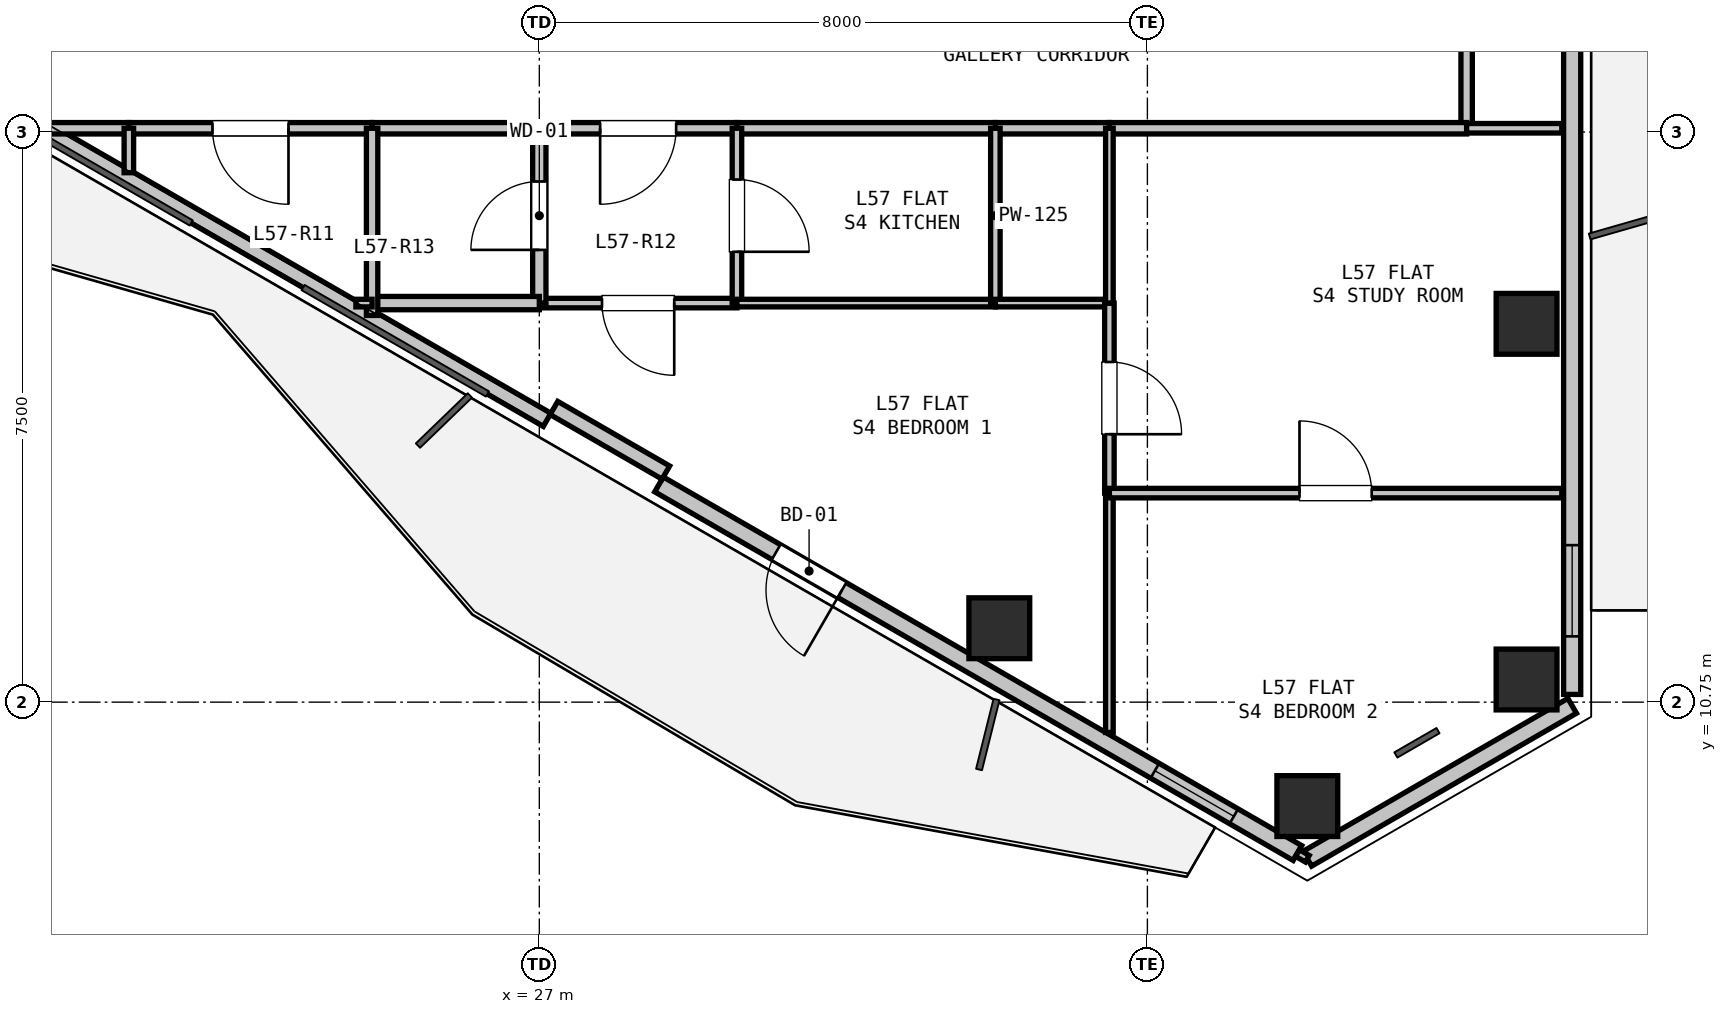
"""IFC4 building model, lengths in metres.
Left out: names, types, materials, properties, quantities, classifications, styles, units other than length and angle.
Written with IfcOpenShell. Run it as: python <this file> out.ifc"""

import sys

from ifc_helpers import new_model, si_unit, direction, frame, frame_2d, origin, origin_2d, place, context, subcontext, project, spatial, rectangle, hollow_rectangle, extrude, element, fill, save


model = new_model("IFC4")
c1 = context("Model", 3, precision=1e-05, world=origin(), true_north=direction((0.0, 1.0)))
c2 = subcontext(c1, "Body", "Model", "MODEL_VIEW")
j1 = project(units=[si_unit("LENGTHUNIT", "METRE"), si_unit("PLANEANGLEUNIT", "RADIAN")], contexts=[c1])
p1 = place(None, origin())
s1 = spatial("IfcSite", under=j1, at=p1, CompositionType="ELEMENT")
p2 = place(p1, origin())
s2 = spatial("IfcBuilding", under=s1, at=p2, CompositionType="ELEMENT")
p3 = place(p2, frame((0.0, 0.0, 205.2)))
s3 = spatial("IfcBuildingStorey", under=s2, at=p3, CompositionType="ELEMENT", Elevation=205.2)
for number, where, z_axis, x_axis in (
    (1, (39.988, 15.727, 0.0), (0.0, 0.0, 1.0), (1.0, 0.0, 0.0)),
    (2, (39.988, 11.048, 0.0), (0.0, 0.0, 1.0), (1.0, 0.0, 0.0)),
    (3, (37.104, 9.383, 0.0), (0.0, 0.0, 1.0), (1.0, 0.0, 0.0)),
    (4, (33.052, 11.722, 0.0), (0.0, 0.0, 1.0), (1.0, 0.0, 0.0)),
):
    element("IfcColumn", number, at=place(p3, frame(where, z_axis=z_axis, x_axis=x_axis)), inside=s3, PredefinedType="COLUMN", context=c2, shape_type="SweptSolid", body=[
        extrude(hollow_rectangle(XDim=0.8, YDim=0.8, WallThickness=0.025, at=origin_2d()), origin(), (0.0, 0.0, 1.0), 3.3),
    ])
p4 = place(p3, frame((40.588, 10.702, 0.0), z_axis=(0.0, 0.0, 1.0), x_axis=(-0.866023907196, -0.500002592159, 0.0)))
e5 = element("IfcWall", 5, at=p4, inside=s3, PredefinedType="SOLIDWALL", context=c2, shape_type="SweptSolid", body=[
    extrude(rectangle(XDim=4.023, YDim=0.225, at=frame_2d((2.012, 0.0))), origin(), (0.0, 0.0, 1.0), 2.69),
])
p5 = place(p3, frame((40.588, 20.551, 0.0), z_axis=(0.0, 0.0, 1.0), x_axis=(0.0, -1.0, 0.0)))
e6 = element("IfcWall", 6, at=p5, inside=s3, PredefinedType="SOLIDWALL", context=c2, shape_type="SweptSolid", body=[
    extrude(rectangle(XDim=9.699, YDim=0.225, at=frame_2d((4.85, 0.0))), origin(), (0.0, 0.0, 1.0), 2.69),
])
p6 = place(p5, frame((7.735, 0.0, 0.9)))
e7 = element("IfcOpeningElement", 7, at=p6, cuts=e6, PredefinedType="OPENING", context=c2, shape_type="SweptSolid", body=[
    extrude(rectangle(XDim=1.2, YDim=1.4, at=frame_2d((0.6, 0.7))), frame((0.0, 0.123, 0.0), z_axis=(0.0, -1.0, 0.0), x_axis=(1.0, 0.0, 0.0)), (0.0, 0.0, 1.0), 0.245),
])
p7 = place(p3, frame((36.974, 8.765, 0.0), z_axis=(0.0, 0.0, 1.0), x_axis=(-0.866016233231, 0.500015883528, 0.0)))
e8 = element("IfcWall", 8, at=p7, inside=s3, PredefinedType="SOLIDWALL", context=c2, shape_type="SweptSolid", body=[
    extrude(rectangle(XDim=9.699, YDim=0.225, at=frame_2d((4.85, 0.0))), origin(), (0.0, 0.0, 1.0), 2.69),
])
p8 = place(p7, frame((6.919, 0.0, 0.0)))
e9 = element("IfcOpeningElement", 9, at=p8, cuts=e8, PredefinedType="OPENING", context=c2, shape_type="SweptSolid", body=[
    extrude(rectangle(XDim=1.0, YDim=2.1, at=frame_2d((0.5, 1.05))), frame((0.0, 0.123, 0.0), z_axis=(0.0, -1.0, 0.0), x_axis=(1.0, 0.0, 0.0)), (0.0, 0.0, 1.0), 0.245),
])
p9 = place(p7, frame((0.966, 0.0, 0.9)))
e10 = element("IfcOpeningElement", 10, at=p9, cuts=e8, PredefinedType="OPENING", context=c2, shape_type="SweptSolid", body=[
    extrude(rectangle(XDim=1.2, YDim=1.4, at=frame_2d((0.6, 0.7))), frame((0.0, 0.123, 0.0), z_axis=(0.0, -1.0, 0.0), x_axis=(1.0, 0.0, 0.0)), (0.0, 0.0, 1.0), 0.245),
])
p10 = place(p3, frame((27.102, 14.464, 0.0), z_axis=(0.0, 0.0, 1.0), x_axis=(-0.866020680503, 0.500008180874, 0.0)))
e11 = element("IfcWall", 11, at=p10, inside=s3, PredefinedType="PARAPET", context=c2, shape_type="SweptSolid", body=[
    extrude(rectangle(XDim=8.999, YDim=0.2, at=frame_2d((4.5, 0.0))), origin(), (0.0, 0.0, 1.0), 0.2),
])
p11 = place(p3, frame((28.665, 13.77, 0.0), z_axis=(0.0, 0.0, 1.0), x_axis=(-0.866025371046, 0.500000056704, 0.0)))
e12 = element("IfcWall", 12, at=p11, inside=s3, PredefinedType="PARAPET", context=c2, shape_type="SweptSolid", body=[
    extrude(rectangle(XDim=1.7, YDim=0.2, at=frame_2d((0.85, 0.0))), origin(), (0.0, 0.0, 1.0), 2.69),
])
p12 = place(p3, frame((39.2, 19.9, 0.0), z_axis=(0.0, 0.0, 1.0), x_axis=(0.0, -1.0, 0.0)))
e13 = element("IfcWall", 13, at=p12, inside=s3, PredefinedType="PARTITIONING", context=c2, shape_type="SweptSolid", body=[
    extrude(rectangle(XDim=1.6, YDim=0.15, at=frame_2d((0.8, 0.0))), origin(), (0.0, 0.0, 1.0), 3.07),
])
p13 = place(p3, frame((39.2, 18.3, 0.0), z_axis=(0.0, 0.0, 1.0), x_axis=(-1.0, 0.0, 0.0)))
e14 = element("IfcWall", 14, at=p13, inside=s3, PredefinedType="PARTITIONING", context=c2, shape_type="SweptSolid", body=[
    extrude(rectangle(XDim=4.7, YDim=0.15, at=frame_2d((2.35, 0.0))), origin(), (0.0, 0.0, 1.0), 2.518),
])
p14 = place(p3, frame((34.5, 18.3, 0.0), z_axis=(0.0, 0.0, 1.0), x_axis=(-1.0, 0.0, 0.0)))
e15 = element("IfcWall", 15, at=p14, inside=s3, PredefinedType="PARTITIONING", context=c2, shape_type="SweptSolid", body=[
    extrude(rectangle(XDim=1.5, YDim=0.15, at=frame_2d((0.75, 0.0))), origin(), (0.0, 0.0, 1.0), 3.07),
])
p15 = place(p3, frame((33.0, 18.3, 0.0), z_axis=(0.0, 0.0, 1.0), x_axis=(-1.0, 0.0, 0.0)))
e16 = element("IfcWall", 16, at=p15, inside=s3, PredefinedType="PARTITIONING", context=c2, shape_type="SweptSolid", body=[
    extrude(rectangle(XDim=3.4, YDim=0.15, at=frame_2d((1.7, 0.0))), origin(), (0.0, 0.0, 1.0), 3.07),
])
p16 = place(p3, frame((29.6, 18.3, 0.0), z_axis=(0.0, 0.0, 1.0), x_axis=(-1.0, 0.0, 0.0)))
e17 = element("IfcWall", 17, at=p16, inside=s3, PredefinedType="PARTITIONING", context=c2, shape_type="SweptSolid", body=[
    extrude(rectangle(XDim=2.6, YDim=0.15, at=frame_2d((1.3, 0.0))), origin(), (0.0, 0.0, 1.0), 3.07),
])
p17 = place(p16, frame((0.8, 0.0, 0.0)))
e18 = element("IfcOpeningElement", 18, at=p17, cuts=e17, PredefinedType="OPENING", context=c2, shape_type="SweptSolid", body=[
    extrude(rectangle(XDim=1.0, YDim=2.15, at=frame_2d((0.5, 1.075))), frame((0.0, 0.085, 0.0), z_axis=(0.0, -1.0, 0.0), x_axis=(1.0, 0.0, 0.0)), (0.0, 0.0, 1.0), 0.17),
])
p18 = place(p3, frame((27.0, 18.3, 0.0), z_axis=(0.0, 0.0, 1.0), x_axis=(-1.0, 0.0, 0.0)))
e19 = element("IfcWall", 19, at=p18, inside=s3, PredefinedType="PARTITIONING", context=c2, shape_type="SweptSolid", body=[
    extrude(rectangle(XDim=2.2, YDim=0.15, at=frame_2d((1.1, 0.0))), origin(), (0.0, 0.0, 1.0), 2.518),
])
p19 = place(p3, frame((24.8, 18.3, 0.0), z_axis=(0.0, 0.0, 1.0), x_axis=(-1.0, 0.0, 0.0)))
e20 = element("IfcWall", 20, at=p19, inside=s3, PredefinedType="PARTITIONING", context=c2, shape_type="SweptSolid", body=[
    extrude(rectangle(XDim=3.2, YDim=0.15, at=frame_2d((1.6, 0.0))), origin(), (0.0, 0.0, 1.0), 2.365),
])
p20 = place(p19, frame((1.1, 0.0, 0.0)))
e21 = element("IfcOpeningElement", 21, at=p20, cuts=e20, PredefinedType="OPENING", context=c2, shape_type="SweptSolid", body=[
    extrude(rectangle(XDim=1.0, YDim=2.15, at=frame_2d((0.5, 1.075))), frame((0.0, 0.085, 0.0), z_axis=(0.0, -1.0, 0.0), x_axis=(1.0, 0.0, 0.0)), (0.0, 0.0, 1.0), 0.17),
])
p21 = place(p3, frame((21.6, 18.3, 0.0), z_axis=(0.0, 0.0, 1.0), x_axis=(-1.0, 0.0, 0.0)))
e22 = element("IfcWall", 22, at=p21, inside=s3, PredefinedType="PARTITIONING", context=c2, shape_type="SweptSolid", body=[
    extrude(rectangle(XDim=1.072, YDim=0.15, at=frame_2d((0.536, 0.0))), origin(), (0.0, 0.0, 1.0), 2.365),
])
p22 = place(p3, frame((29.6, 16.0, 0.0), z_axis=(0.0, 0.0, 1.0), x_axis=(-1.0, 0.0, 0.0)))
e23 = element("IfcWall", 23, at=p22, inside=s3, PredefinedType="PARTITIONING", context=c2, shape_type="SweptSolid", body=[
    extrude(rectangle(XDim=2.6, YDim=0.125, at=frame_2d((1.3, 0.0))), origin(), (0.0, 0.0, 1.0), 2.518),
])
p23 = place(p22, frame((0.825, 0.0, 0.0)))
e24 = element("IfcOpeningElement", 24, at=p23, cuts=e23, PredefinedType="OPENING", context=c2, shape_type="SweptSolid", body=[
    extrude(rectangle(XDim=0.95, YDim=2.1, at=frame_2d((0.475, 1.05))), frame((0.0, 0.073, 0.0), z_axis=(0.0, -1.0, 0.0), x_axis=(1.0, 0.0, 0.0)), (0.0, 0.0, 1.0), 0.145),
])
p24 = place(p3, frame((27.0, 16.0, 0.0), z_axis=(0.0, 0.0, 1.0), x_axis=(0.0, 1.0, 0.0)))
e25 = element("IfcWall", 25, at=p24, inside=s3, PredefinedType="PLUMBINGWALL", context=c2, shape_type="SweptSolid", body=[
    extrude(rectangle(XDim=2.3, YDim=0.175, at=frame_2d((1.15, 0.0))), origin(), (0.0, 0.0, 1.0), 2.518),
])
p25 = place(p24, frame((0.7, 0.0, 0.0)))
e26 = element("IfcOpeningElement", 26, at=p25, cuts=e25, PredefinedType="OPENING", context=c2, shape_type="SweptSolid", body=[
    extrude(rectangle(XDim=0.9, YDim=2.1, at=frame_2d((0.45, 1.05))), frame((0.0, 0.097, 0.0), z_axis=(0.0, -1.0, 0.0), x_axis=(1.0, 0.0, 0.0)), (0.0, 0.0, 1.0), 0.195),
])
p26 = place(p3, frame((29.6, 18.3, 0.0), z_axis=(0.0, 0.0, 1.0), x_axis=(0.0, -1.0, 0.0)))
e27 = element("IfcWall", 27, at=p26, inside=s3, PredefinedType="PARTITIONING", context=c2, shape_type="SweptSolid", body=[
    extrude(rectangle(XDim=2.3, YDim=0.125, at=frame_2d((1.15, 0.0))), origin(), (0.0, 0.0, 1.0), 3.07),
])
p27 = place(p26, frame((0.675, 0.0, 0.0)))
e28 = element("IfcOpeningElement", 28, at=p27, cuts=e27, PredefinedType="OPENING", context=c2, shape_type="SweptSolid", body=[
    extrude(rectangle(XDim=0.95, YDim=2.1, at=frame_2d((0.475, 1.05))), frame((0.0, 0.073, 0.0), z_axis=(0.0, -1.0, 0.0), x_axis=(1.0, 0.0, 0.0)), (0.0, 0.0, 1.0), 0.145),
])
p28 = place(p3, frame((27.0, 16.0, 0.0), z_axis=(0.0, 0.0, 1.0), x_axis=(-1.0, 0.0, 0.0)))
e29 = element("IfcWall", 29, at=p28, inside=s3, PredefinedType="PLUMBINGWALL", context=c2, shape_type="SweptSolid", body=[
    extrude(rectangle(XDim=2.2, YDim=0.175, at=frame_2d((1.1, 0.0))), origin(), (0.0, 0.0, 1.0), 2.365),
])
p29 = place(p3, frame((24.8, 15.838, 0.0), z_axis=(0.0, 0.0, 1.0), x_axis=(0.0, 1.0, 0.0)))
e30 = element("IfcWall", 30, at=p29, inside=s3, PredefinedType="PARTITIONING", context=c2, shape_type="SweptSolid", body=[
    extrude(rectangle(XDim=2.462, YDim=0.15, at=frame_2d((1.231, 0.0))), origin(), (0.0, 0.0, 1.0), 2.365),
])
p30 = place(p3, frame((33.0, 16.0, 0.0), z_axis=(0.0, 0.0, 1.0), x_axis=(-1.0, 0.0, 0.0)))
e31 = element("IfcWall", 31, at=p30, inside=s3, PredefinedType="PARTITIONING", context=c2, shape_type="SweptSolid", body=[
    extrude(rectangle(XDim=3.4, YDim=0.1, at=frame_2d((1.7, 0.0))), origin(), (0.0, 0.0, 1.0), 3.07),
])
p31 = place(p3, frame((33.0, 18.3, 0.0), z_axis=(0.0, 0.0, 1.0), x_axis=(0.0, -1.0, 0.0)))
e32 = element("IfcWall", 32, at=p31, inside=s3, PredefinedType="PARTITIONING", context=c2, shape_type="SweptSolid", body=[
    extrude(rectangle(XDim=2.3, YDim=0.125, at=frame_2d((1.15, 0.0))), origin(), (0.0, 0.0, 1.0), 3.07),
])
p32 = place(p3, frame((24.8, 16.0, 0.0), z_axis=(0.0, 0.0, 1.0), x_axis=(-1.0, 0.0, 0.0)))
e33 = element("IfcWall", 33, at=p32, inside=s3, PredefinedType="PARTITIONING", context=c2, shape_type="SweptSolid", body=[
    extrude(rectangle(XDim=0.213, YDim=0.1, at=frame_2d((0.106, 0.0))), origin(), (0.0, 0.0, 1.0), 3.07),
])
p33 = place(p3, frame((21.6, 17.715, 0.0), z_axis=(0.0, 0.0, 1.0), x_axis=(0.0, 1.0, 0.0)))
e34 = element("IfcWall", 34, at=p33, inside=s3, PredefinedType="PARTITIONING", context=c2, shape_type="SweptSolid", body=[
    extrude(rectangle(XDim=0.585, YDim=0.125, at=frame_2d((0.292, 0.0))), origin(), (0.0, 0.0, 1.0), 2.365),
])
p34 = place(p3, frame((33.0, 16.0, 0.0), z_axis=(0.0, 0.0, 1.0), x_axis=(1.0, 0.0, 0.0)))
e35 = element("IfcWall", 35, at=p34, inside=s3, PredefinedType="PARTITIONING", context=c2, shape_type="SweptSolid", body=[
    extrude(rectangle(XDim=1.5, YDim=0.1, at=frame_2d((0.75, 0.0))), origin(), (0.0, 0.0, 1.0), 3.07),
])
p35 = place(p3, frame((34.5, 16.0, 0.0), z_axis=(0.0, 0.0, 1.0), x_axis=(0.0, -1.0, 0.0)))
e36 = element("IfcWall", 36, at=p35, inside=s3, PredefinedType="PARTITIONING", context=c2, shape_type="SweptSolid", body=[
    extrude(rectangle(XDim=2.5, YDim=0.125, at=frame_2d((1.25, 0.0))), origin(), (0.0, 0.0, 1.0), 3.07),
])
p36 = place(p35, frame((0.775, 0.0, 0.0)))
e37 = element("IfcOpeningElement", 37, at=p36, cuts=e36, PredefinedType="OPENING", context=c2, shape_type="SweptSolid", body=[
    extrude(rectangle(XDim=0.95, YDim=2.1, at=frame_2d((0.475, 1.05))), frame((0.0, 0.073, 0.0), z_axis=(0.0, -1.0, 0.0), x_axis=(1.0, 0.0, 0.0)), (0.0, 0.0, 1.0), 0.145),
])
p37 = place(p3, frame((34.5, 13.5, 0.0), z_axis=(0.0, 0.0, 1.0), x_axis=(0.0, -1.0, 0.0)))
e38 = element("IfcWall", 38, at=p37, inside=s3, PredefinedType="PARTITIONING", context=c2, shape_type="SweptSolid", body=[
    extrude(rectangle(XDim=3.149, YDim=0.1, at=frame_2d((1.574, 0.0))), origin(), (0.0, 0.0, 1.0), 2.795),
])
p38 = place(p3, frame((34.5, 13.5, 0.0), z_axis=(0.0, 0.0, 1.0), x_axis=(1.0, 0.0, 0.0)))
e39 = element("IfcWall", 39, at=p38, inside=s3, PredefinedType="PARTITIONING", context=c2, shape_type="SweptSolid", body=[
    extrude(rectangle(XDim=5.952, YDim=0.125, at=frame_2d((2.976, 0.0))), origin(), (0.0, 0.0, 1.0), 2.518),
])
p39 = place(p38, frame((2.501, 0.0, 0.0)))
e40 = element("IfcOpeningElement", 40, at=p39, cuts=e39, PredefinedType="OPENING", context=c2, shape_type="SweptSolid", body=[
    extrude(rectangle(XDim=0.95, YDim=2.1, at=frame_2d((0.475, 1.05))), frame((0.0, 0.073, 0.0), z_axis=(0.0, -1.0, 0.0), x_axis=(1.0, 0.0, 0.0)), (0.0, 0.0, 1.0), 0.145),
])
p40 = place(p3, frame((37.104, 8.69, 0.0), z_axis=(0.0, 0.0, 1.0), x_axis=(-0.866131372301, 0.499816412211, 0.0)))
e41 = element("IfcWall", 41, at=p40, inside=s3, PredefinedType="PARTITIONING", context=c2, shape_type="SweptSolid", body=[
    extrude(rectangle(XDim=0.15, YDim=0.1, at=frame_2d((0.075, 0.0))), origin(), (0.0, 0.0, 1.0), 3.07),
])
p41 = place(p3, frame((39.2, 18.3, 0.0), z_axis=(0.0, 0.0, 1.0), x_axis=(1.0, 0.0, 0.0)))
e42 = element("IfcWall", 42, at=p41, inside=s3, PredefinedType="PARTITIONING", context=c2, shape_type="SweptSolid", body=[
    extrude(rectangle(XDim=1.252, YDim=0.125, at=frame_2d((0.626, 0.0))), origin(), (0.0, 0.0, 1.0), 2.365),
])
p42 = place(p3, frame((34.5, 16.0, 0.0), z_axis=(0.0, 0.0, 1.0), x_axis=(0.0, 1.0, 0.0)))
e43 = element("IfcWall", 43, at=p42, inside=s3, PredefinedType="PARTITIONING", context=c2, shape_type="SweptSolid", body=[
    extrude(rectangle(XDim=2.3, YDim=0.1, at=frame_2d((1.15, 0.0))), origin(), (0.0, 0.0, 1.0), 3.07),
])
p43 = place(p6, origin())
e44 = element("IfcWindow", 44, at=p43, inside=s3, PartitioningType="SINGLE_PANEL", PredefinedType="WINDOW", context=c2, shape_type="SweptSolid", body=[
    extrude(rectangle(XDim=1.2, YDim=1.4, at=frame_2d((0.6, 0.7))), frame((0.0, 0.03, 0.0), z_axis=(0.0, -1.0, 0.0), x_axis=(1.0, 0.0, 0.0)), (0.0, 0.0, 1.0), 0.06),
])
fill(e7, e44)
p44 = place(p8, origin())
e45 = element("IfcDoor", 45, at=p44, inside=s3, OperationType="SINGLE_SWING_LEFT", PredefinedType="DOOR", context=c2, shape_type="SweptSolid", body=[
    extrude(rectangle(XDim=1.0, YDim=2.1, at=frame_2d((0.5, 1.05))), frame((0.0, 0.025, 0.0), z_axis=(0.0, -1.0, 0.0), x_axis=(1.0, 0.0, 0.0)), (0.0, 0.0, 1.0), 0.05),
])
fill(e9, e45)
p45 = place(p9, origin())
e46 = element("IfcWindow", 46, at=p45, inside=s3, PartitioningType="SINGLE_PANEL", PredefinedType="WINDOW", context=c2, shape_type="SweptSolid", body=[
    extrude(rectangle(XDim=1.2, YDim=1.4, at=frame_2d((0.6, 0.7))), frame((0.0, 0.03, 0.0), z_axis=(0.0, -1.0, 0.0), x_axis=(1.0, 0.0, 0.0)), (0.0, 0.0, 1.0), 0.06),
])
fill(e10, e46)
p46 = place(p17, origin())
e47 = element("IfcDoor", 47, at=p46, inside=s3, OperationType="SINGLE_SWING_RIGHT", PredefinedType="DOOR", context=c2, shape_type="SweptSolid", body=[
    extrude(rectangle(XDim=1.0, YDim=2.15, at=frame_2d((0.5, 1.075))), frame((0.0, 0.025, 0.0), z_axis=(0.0, -1.0, 0.0), x_axis=(1.0, 0.0, 0.0)), (0.0, 0.0, 1.0), 0.05),
])
fill(e18, e47)
p47 = place(p20, origin())
e48 = element("IfcDoor", 48, at=p47, inside=s3, OperationType="SINGLE_SWING_LEFT", PredefinedType="DOOR", context=c2, shape_type="SweptSolid", body=[
    extrude(rectangle(XDim=1.0, YDim=2.15, at=frame_2d((0.5, 1.075))), frame((0.0, 0.025, 0.0), z_axis=(0.0, -1.0, 0.0), x_axis=(1.0, 0.0, 0.0)), (0.0, 0.0, 1.0), 0.05),
])
fill(e21, e48)
p48 = place(p25, origin())
e49 = element("IfcDoor", 49, at=p48, inside=s3, OperationType="SINGLE_SWING_LEFT", PredefinedType="DOOR", context=c2, shape_type="SweptSolid", body=[
    extrude(rectangle(XDim=0.9, YDim=2.1, at=frame_2d((0.45, 1.05))), frame((0.0, 0.025, 0.0), z_axis=(0.0, -1.0, 0.0), x_axis=(1.0, 0.0, 0.0)), (0.0, 0.0, 1.0), 0.05),
])
fill(e26, e49)
p49 = place(p27, origin())
e50 = element("IfcDoor", 50, at=p49, inside=s3, OperationType="SINGLE_SWING_RIGHT", PredefinedType="DOOR", context=c2, shape_type="SweptSolid", body=[
    extrude(rectangle(XDim=0.95, YDim=2.1, at=frame_2d((0.475, 1.05))), frame((0.0, 0.025, 0.0), z_axis=(0.0, -1.0, 0.0), x_axis=(1.0, 0.0, 0.0)), (0.0, 0.0, 1.0), 0.05),
])
fill(e28, e50)
p50 = place(p23, origin())
e51 = element("IfcDoor", 51, at=p50, inside=s3, OperationType="SINGLE_SWING_LEFT", PredefinedType="DOOR", context=c2, shape_type="SweptSolid", body=[
    extrude(rectangle(XDim=0.95, YDim=2.1, at=frame_2d((0.475, 1.05))), frame((0.0, 0.025, 0.0), z_axis=(0.0, -1.0, 0.0), x_axis=(1.0, 0.0, 0.0)), (0.0, 0.0, 1.0), 0.05),
])
fill(e24, e51)
p51 = place(p36, origin())
e52 = element("IfcDoor", 52, at=p51, inside=s3, OperationType="SINGLE_SWING_RIGHT", PredefinedType="DOOR", context=c2, shape_type="SweptSolid", body=[
    extrude(rectangle(XDim=0.95, YDim=2.1, at=frame_2d((0.475, 1.05))), frame((0.0, 0.025, 0.0), z_axis=(0.0, -1.0, 0.0), x_axis=(1.0, 0.0, 0.0)), (0.0, 0.0, 1.0), 0.05),
])
fill(e37, e52)
p52 = place(p39, origin())
e53 = element("IfcDoor", 53, at=p52, inside=s3, OperationType="SINGLE_SWING_LEFT", PredefinedType="DOOR", context=c2, shape_type="SweptSolid", body=[
    extrude(rectangle(XDim=0.95, YDim=2.1, at=frame_2d((0.475, 1.05))), frame((0.0, 0.025, 0.0), z_axis=(0.0, -1.0, 0.0), x_axis=(1.0, 0.0, 0.0)), (0.0, 0.0, 1.0), 0.05),
])
fill(e40, e53)
save(model, sys.argv[1])
